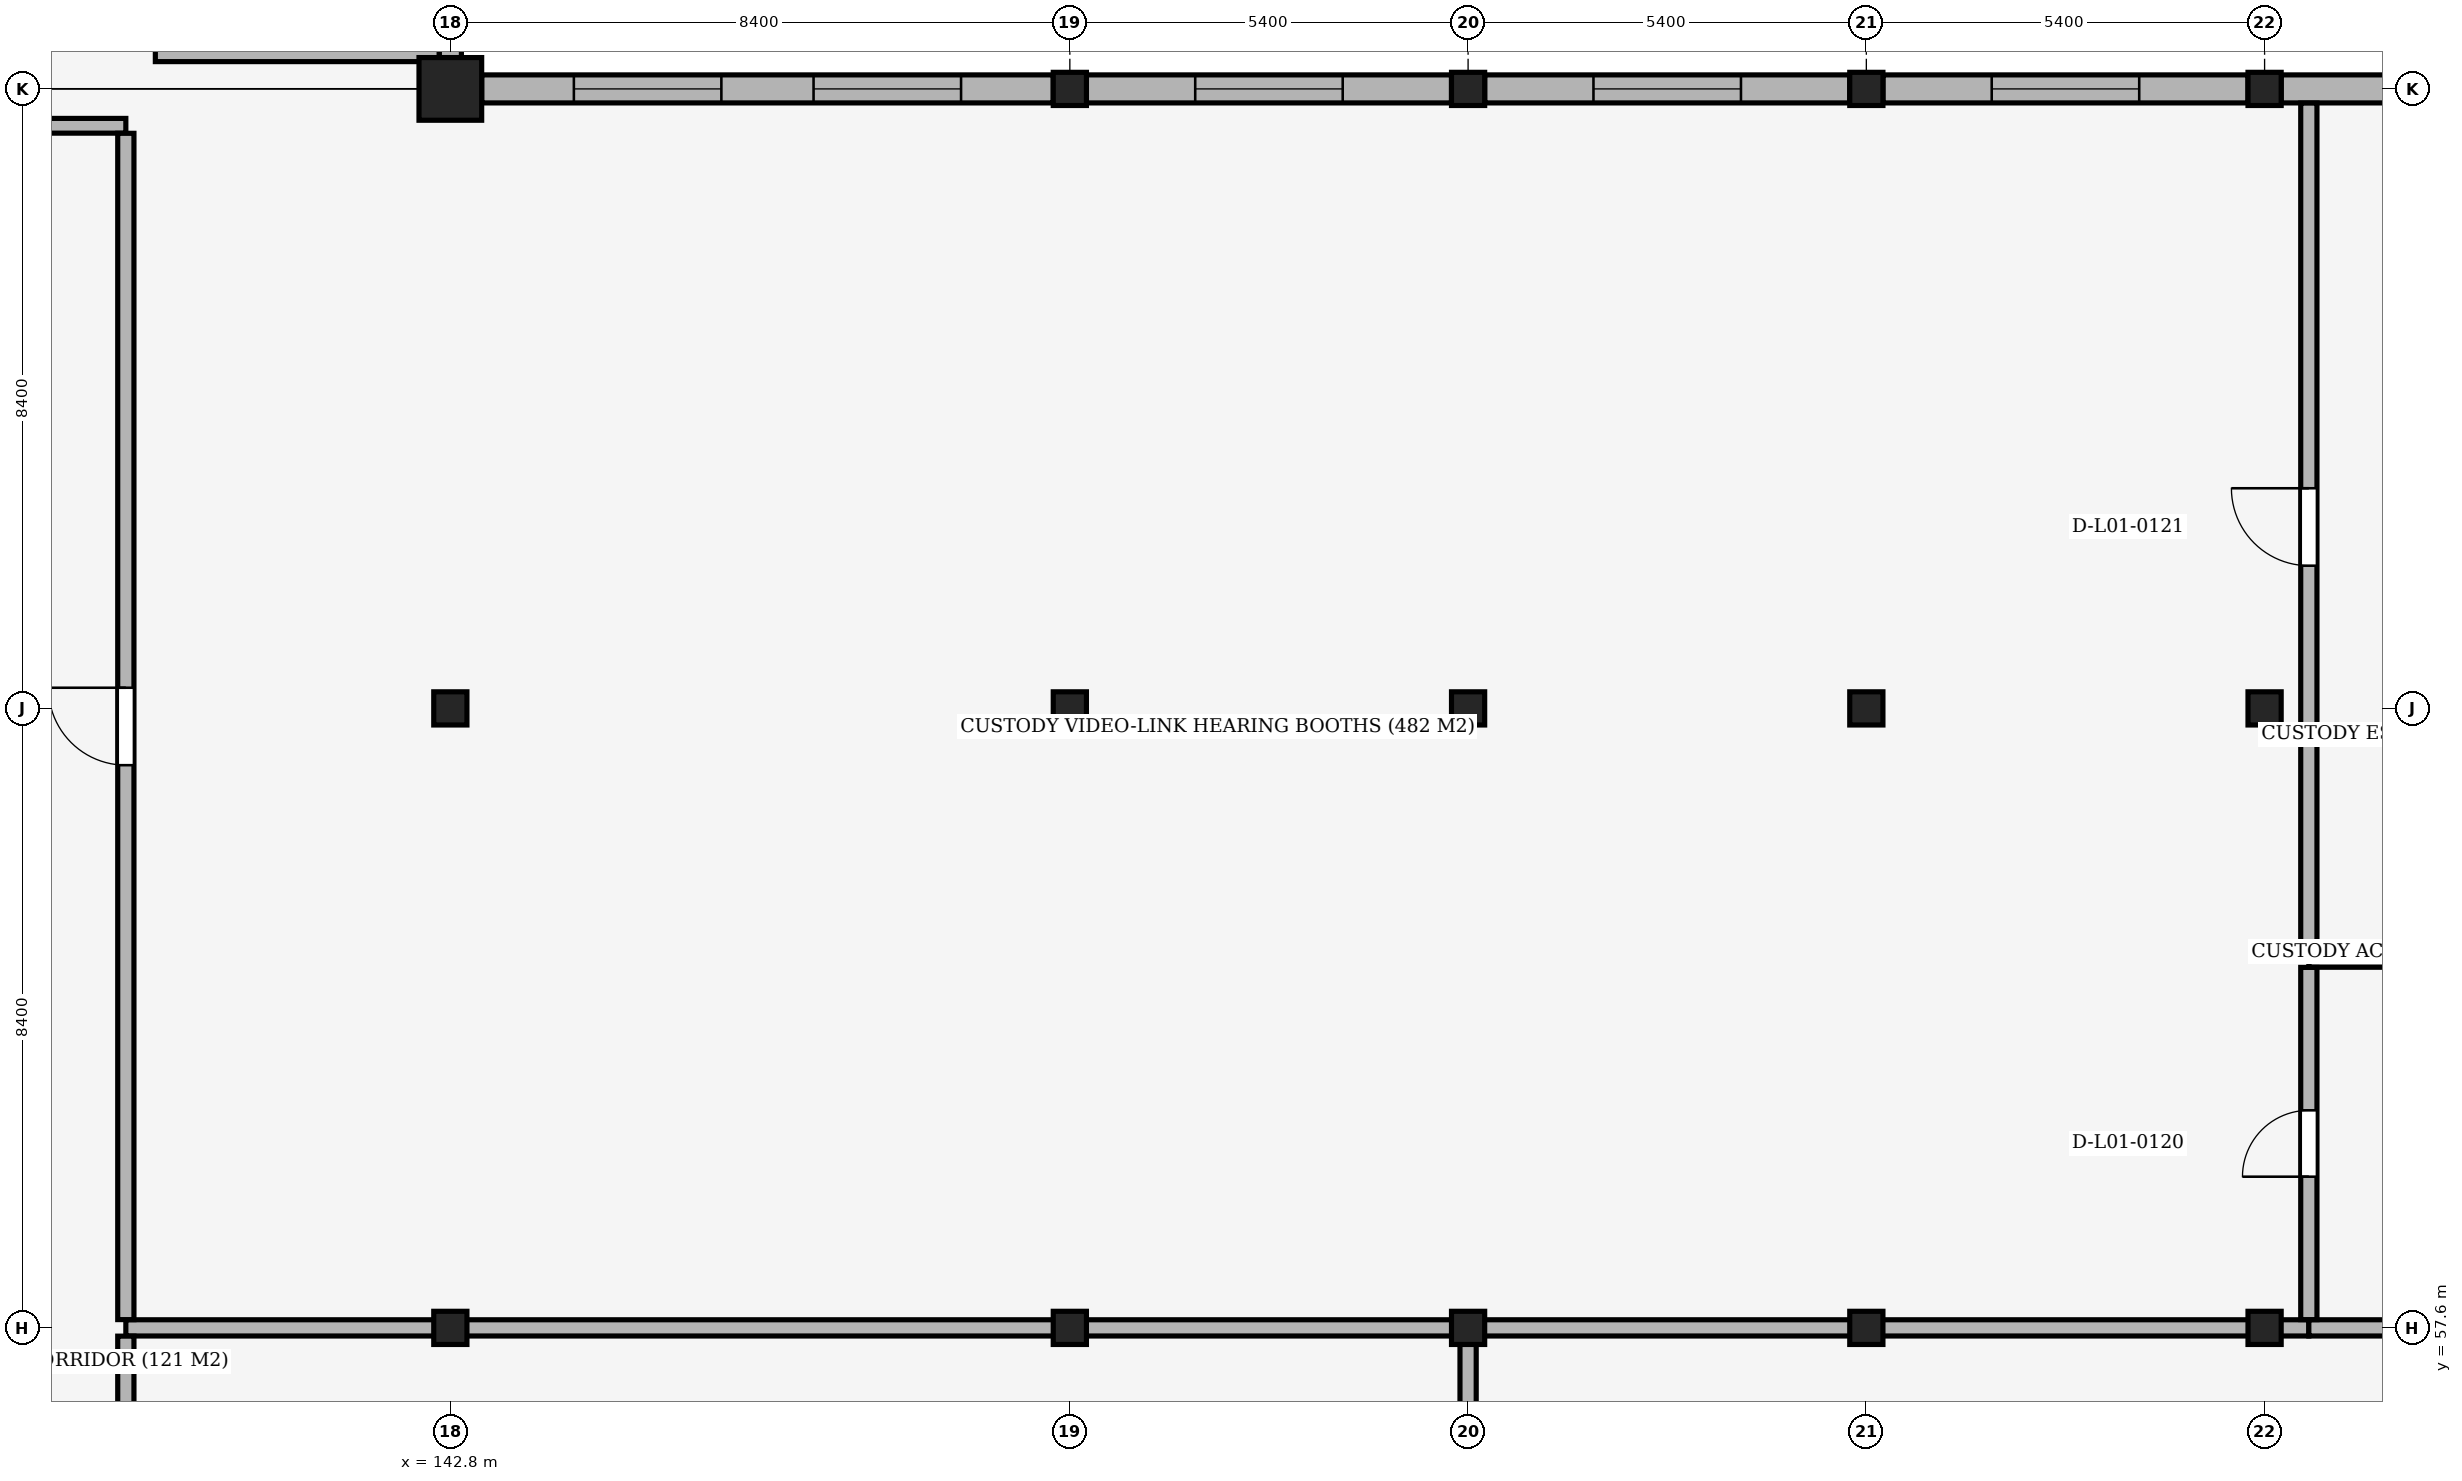
"""IFC4 building model, lengths in metres.
Left out: names, types, materials, properties, quantities, classifications, styles, units other than length and angle.
Written with IfcOpenShell. Run it as: python <this file> out.ifc"""

import sys

from ifc_helpers import new_model, si_unit, direction, frame, frame_2d, origin, origin_2d, place, context, subcontext, project, spatial, rectangle, extrude, element, fill, save


model = new_model("IFC4")
c1 = context("Model", 3, precision=1e-05, world=origin(), true_north=direction((0.0, 1.0)))
c2 = subcontext(c1, "Body", "Model", "MODEL_VIEW")
j1 = project(units=[si_unit("LENGTHUNIT", "METRE"), si_unit("PLANEANGLEUNIT", "RADIAN")], contexts=[c1])
p1 = place(None, origin())
s1 = spatial("IfcSite", under=j1, at=p1, CompositionType="ELEMENT")
p2 = place(p1, origin())
s2 = spatial("IfcBuilding", under=s1, at=p2, CompositionType="ELEMENT")
p3 = place(p2, frame((0.0, 0.0, 5.1)))
s3 = spatial("IfcBuildingStorey", under=s2, at=p3, CompositionType="ELEMENT", Elevation=5.1)
for number, where, z_axis, x_axis in (
    (1, (142.8, 57.6, 0.0), (0.0, 0.0, 1.0), (1.0, 0.0, 0.0)),
    (2, (142.8, 66.0, 0.0), (0.0, 0.0, 1.0), (1.0, 0.0, 0.0)),
):
    element("IfcColumn", number, at=place(p3, frame(where, z_axis=z_axis, x_axis=x_axis)), inside=s3, PredefinedType="COLUMN", context=c2, shape_type="SweptSolid", body=[
        extrude(rectangle(XDim=0.45, YDim=0.45, at=origin_2d()), origin(), (0.0, 0.0, 1.0), 5.1),
    ])
p4 = place(p3, frame((142.8, 74.4, 0.0), z_axis=(0.0, 0.0, 1.0), x_axis=(1.0, 0.0, 0.0)))
e3 = element("IfcColumn", 3, at=p4, inside=s3, PredefinedType="COLUMN", context=c2, shape_type="SweptSolid", body=[
    extrude(rectangle(XDim=0.85, YDim=0.85, at=origin_2d()), origin(), (0.0, 0.0, 1.0), 5.1),
])
for number, where, z_axis, x_axis in (
    (4, (151.2, 57.6, 0.0), (0.0, 0.0, 1.0), (1.0, 0.0, 0.0)),
    (5, (151.2, 66.0, 0.0), (0.0, 0.0, 1.0), (1.0, 0.0, 0.0)),
    (6, (151.2, 74.4, 0.0), (0.0, 0.0, 1.0), (1.0, 0.0, 0.0)),
    (7, (156.6, 57.6, 0.0), (0.0, 0.0, 1.0), (1.0, 0.0, 0.0)),
    (8, (156.6, 66.0, 0.0), (0.0, 0.0, 1.0), (1.0, 0.0, 0.0)),
    (9, (156.6, 74.4, 0.0), (0.0, 0.0, 1.0), (1.0, 0.0, 0.0)),
    (10, (162.0, 57.6, 0.0), (0.0, 0.0, 1.0), (1.0, 0.0, 0.0)),
    (11, (162.0, 66.0, 0.0), (0.0, 0.0, 1.0), (1.0, 0.0, 0.0)),
    (12, (162.0, 74.4, 0.0), (0.0, 0.0, 1.0), (1.0, 0.0, 0.0)),
    (13, (167.4, 57.6, 0.0), (0.0, 0.0, 1.0), (1.0, 0.0, 0.0)),
    (14, (167.4, 66.0, 0.0), (0.0, 0.0, 1.0), (1.0, 0.0, 0.0)),
    (15, (167.4, 74.4, 0.0), (0.0, 0.0, 1.0), (1.0, 0.0, 0.0)),
):
    element("IfcColumn", number, at=place(p3, frame(where, z_axis=z_axis, x_axis=x_axis)), inside=s3, PredefinedType="COLUMN", context=c2, shape_type="SweptSolid", body=[
        extrude(rectangle(XDim=0.45, YDim=0.45, at=origin_2d()), origin(), (0.0, 0.0, 1.0), 5.1),
    ])
p5 = place(p3, frame((142.8, 79.375, 0.0), z_axis=(0.0, 0.0, 1.0), x_axis=(0.0, -1.0, 0.0)))
e16 = element("IfcWall", 16, at=p5, inside=s3, PredefinedType="SOLIDWALL", context=c2, shape_type="SweptSolid", body=[
    extrude(rectangle(XDim=4.55, YDim=0.3, at=frame_2d((2.275, 0.0))), origin(), (0.0, 0.0, 1.0), 4.27),
])
p6 = place(p5, frame((1.525, 0.0, 0.9)))
e17 = element("IfcOpeningElement", 17, at=p6, cuts=e16, PredefinedType="OPENING", context=c2, shape_type="SweptSolid", body=[
    extrude(rectangle(XDim=1.5, YDim=2.1, at=frame_2d((0.75, 1.05))), frame((0.0, 0.165, 0.0), z_axis=(0.0, -1.0, 0.0), x_axis=(1.0, 0.0, 0.0)), (0.0, 0.0, 1.0), 0.33),
])
p7 = place(p3, frame((143.225, 74.4, 0.0), z_axis=(0.0, 0.0, 1.0), x_axis=(1.0, 0.0, 0.0)))
e18 = element("IfcWall", 18, at=p7, inside=s3, PredefinedType="SOLIDWALL", context=c2, shape_type="SweptSolid", body=[
    extrude(rectangle(XDim=7.75, YDim=0.38, at=frame_2d((3.875, 0.0))), origin(), (0.0, 0.0, 1.0), 4.07),
])
p8 = place(p7, frame((1.25, 0.0, 2.1)))
e19 = element("IfcOpeningElement", 19, at=p8, cuts=e18, PredefinedType="OPENING", context=c2, shape_type="SweptSolid", body=[
    extrude(rectangle(XDim=2.0, YDim=1.2, at=frame_2d((1.0, 0.6))), frame((0.0, 0.205, 0.0), z_axis=(0.0, -1.0, 0.0), x_axis=(1.0, 0.0, 0.0)), (0.0, 0.0, 1.0), 0.41),
])
p9 = place(p7, frame((4.5, 0.0, 2.1)))
e20 = element("IfcOpeningElement", 20, at=p9, cuts=e18, PredefinedType="OPENING", context=c2, shape_type="SweptSolid", body=[
    extrude(rectangle(XDim=2.0, YDim=1.2, at=frame_2d((1.0, 0.6))), frame((0.0, 0.205, 0.0), z_axis=(0.0, -1.0, 0.0), x_axis=(1.0, 0.0, 0.0)), (0.0, 0.0, 1.0), 0.41),
])
p10 = place(p3, frame((151.425, 74.4, 0.0), z_axis=(0.0, 0.0, 1.0), x_axis=(1.0, 0.0, 0.0)))
e21 = element("IfcWall", 21, at=p10, inside=s3, PredefinedType="SOLIDWALL", context=c2, shape_type="SweptSolid", body=[
    extrude(rectangle(XDim=4.95, YDim=0.38, at=frame_2d((2.475, 0.0))), origin(), (0.0, 0.0, 1.0), 4.07),
])
p11 = place(p10, frame((1.475, 0.0, 2.1)))
e22 = element("IfcOpeningElement", 22, at=p11, cuts=e21, PredefinedType="OPENING", context=c2, shape_type="SweptSolid", body=[
    extrude(rectangle(XDim=2.0, YDim=1.2, at=frame_2d((1.0, 0.6))), frame((0.0, 0.205, 0.0), z_axis=(0.0, -1.0, 0.0), x_axis=(1.0, 0.0, 0.0)), (0.0, 0.0, 1.0), 0.41),
])
p12 = place(p3, frame((156.825, 74.4, 0.0), z_axis=(0.0, 0.0, 1.0), x_axis=(1.0, 0.0, 0.0)))
e23 = element("IfcWall", 23, at=p12, inside=s3, PredefinedType="SOLIDWALL", context=c2, shape_type="SweptSolid", body=[
    extrude(rectangle(XDim=4.95, YDim=0.38, at=frame_2d((2.475, 0.0))), origin(), (0.0, 0.0, 1.0), 4.22),
])
p13 = place(p12, frame((1.475, 0.0, 2.1)))
e24 = element("IfcOpeningElement", 24, at=p13, cuts=e23, PredefinedType="OPENING", context=c2, shape_type="SweptSolid", body=[
    extrude(rectangle(XDim=2.0, YDim=1.2, at=frame_2d((1.0, 0.6))), frame((0.0, 0.205, 0.0), z_axis=(0.0, -1.0, 0.0), x_axis=(1.0, 0.0, 0.0)), (0.0, 0.0, 1.0), 0.41),
])
p14 = place(p3, frame((162.225, 74.4, 0.0), z_axis=(0.0, 0.0, 1.0), x_axis=(1.0, 0.0, 0.0)))
e25 = element("IfcWall", 25, at=p14, inside=s3, PredefinedType="SOLIDWALL", context=c2, shape_type="SweptSolid", body=[
    extrude(rectangle(XDim=4.95, YDim=0.38, at=frame_2d((2.475, 0.0))), origin(), (0.0, 0.0, 1.0), 4.22),
])
p15 = place(p14, frame((1.475, 0.0, 2.1)))
e26 = element("IfcOpeningElement", 26, at=p15, cuts=e25, PredefinedType="OPENING", context=c2, shape_type="SweptSolid", body=[
    extrude(rectangle(XDim=2.0, YDim=1.2, at=frame_2d((1.0, 0.6))), frame((0.0, 0.205, 0.0), z_axis=(0.0, -1.0, 0.0), x_axis=(1.0, 0.0, 0.0)), (0.0, 0.0, 1.0), 0.41),
])
p16 = place(p3, frame((167.625, 74.4, 0.0), z_axis=(0.0, 0.0, 1.0), x_axis=(1.0, 0.0, 0.0)))
e27 = element("IfcWall", 27, at=p16, inside=s3, PredefinedType="SOLIDWALL", context=c2, shape_type="SweptSolid", body=[
    extrude(rectangle(XDim=4.95, YDim=0.38, at=frame_2d((2.475, 0.0))), origin(), (0.0, 0.0, 1.0), 4.22),
])
p17 = place(p16, frame((1.475, 0.0, 2.1)))
e28 = element("IfcOpeningElement", 28, at=p17, cuts=e27, PredefinedType="OPENING", context=c2, shape_type="SweptSolid", body=[
    extrude(rectangle(XDim=2.0, YDim=1.2, at=frame_2d((1.0, 0.6))), frame((0.0, 0.205, 0.0), z_axis=(0.0, -1.0, 0.0), x_axis=(1.0, 0.0, 0.0)), (0.0, 0.0, 1.0), 0.41),
])
p18 = place(p3, frame((138.4, 57.6, 0.0), z_axis=(0.0, 0.0, 1.0), x_axis=(1.0, 0.0, 0.0)))
e29 = element("IfcWall", 29, at=p18, inside=s3, PredefinedType="PARTITIONING", context=c2, shape_type="SweptSolid", body=[
    extrude(rectangle(XDim=18.2, YDim=0.22, at=frame_2d((9.1, 0.0))), origin(), (0.0, 0.0, 1.0), 4.02),
])
p19 = place(p3, frame((156.6, 57.6, 0.0), z_axis=(0.0, 0.0, 1.0), x_axis=(1.0, 0.0, 0.0)))
e30 = element("IfcWall", 30, at=p19, inside=s3, PredefinedType="PARTITIONING", context=c2, shape_type="SweptSolid", body=[
    extrude(rectangle(XDim=11.4, YDim=0.22, at=frame_2d((5.7, 0.0))), origin(), (0.0, 0.0, 1.0), 4.02),
])
p20 = place(p3, frame((168.0, 57.6, 0.0), z_axis=(0.0, 0.0, 1.0), x_axis=(1.0, 0.0, 0.0)))
e31 = element("IfcWall", 31, at=p20, inside=s3, PredefinedType="PARTITIONING", context=c2, shape_type="SweptSolid", body=[
    extrude(rectangle(XDim=4.741, YDim=0.22, at=frame_2d((2.371, 0.0))), origin(), (0.0, 0.0, 1.0), 4.02),
])
p21 = place(p3, frame((168.0, 62.6, 0.0), z_axis=(0.0, 0.0, 1.0), x_axis=(1.0, 0.0, 0.0)))
e32 = element("IfcWall", 32, at=p21, inside=s3, PredefinedType="PARTITIONING", context=c2, shape_type="SweptSolid", body=[
    extrude(rectangle(XDim=4.608, YDim=0.22, at=frame_2d((2.304, 0.0))), origin(), (0.0, 0.0, 1.0), 4.02),
])
p22 = place(p3, frame((134.592, 73.9, 0.0), z_axis=(0.0, 0.0, 1.0), x_axis=(1.0, 0.0, 0.0)))
e33 = element("IfcWall", 33, at=p22, inside=s3, PredefinedType="PARTITIONING", context=c2, shape_type="SweptSolid", body=[
    extrude(rectangle(XDim=3.808, YDim=0.2, at=frame_2d((1.904, 0.0))), origin(), (0.0, 0.0, 1.0), 4.02),
])
p23 = place(p3, frame((138.8, 74.9, 0.0), z_axis=(0.0, 0.0, 1.0), x_axis=(1.0, 0.0, 0.0)))
e34 = element("IfcWall", 34, at=p23, inside=s3, PredefinedType="PARTITIONING", context=c2, shape_type="SweptSolid", body=[
    extrude(rectangle(XDim=3.848, YDim=0.26, at=frame_2d((1.924, 0.0))), origin(), (0.0, 0.0, 1.0), 4.27),
])
p24 = place(p3, frame((138.4, 41.2, 0.0), z_axis=(0.0, 0.0, 1.0), x_axis=(0.0, 1.0, 0.0)))
e35 = element("IfcWall", 35, at=p24, inside=s3, PredefinedType="PARTITIONING", context=c2, shape_type="SweptSolid", body=[
    extrude(rectangle(XDim=16.288, YDim=0.22, at=frame_2d((8.144, 0.0))), origin(), (0.0, 0.0, 1.0), 4.07),
])
p25 = place(p24, frame((7.619, 0.0, 0.0)))
e36 = element("IfcOpeningElement", 36, at=p25, cuts=e35, PredefinedType="OPENING", context=c2, shape_type="SweptSolid", body=[
    extrude(rectangle(XDim=1.05, YDim=2.15, at=frame_2d((0.525, 1.075))), frame((0.0, 0.125, 0.0), z_axis=(0.0, -1.0, 0.0), x_axis=(1.0, 0.0, 0.0)), (0.0, 0.0, 1.0), 0.25),
])
p26 = place(p3, frame((138.4, 57.712, 0.0), z_axis=(0.0, 0.0, 1.0), x_axis=(0.0, 1.0, 0.0)))
e37 = element("IfcWall", 37, at=p26, inside=s3, PredefinedType="PARTITIONING", context=c2, shape_type="SweptSolid", body=[
    extrude(rectangle(XDim=16.086, YDim=0.22, at=frame_2d((8.043, 0.0))), origin(), (0.0, 0.0, 1.0), 4.07),
])
p27 = place(p26, frame((7.518, 0.0, 0.0)))
e38 = element("IfcOpeningElement", 38, at=p27, cuts=e37, PredefinedType="OPENING", context=c2, shape_type="SweptSolid", body=[
    extrude(rectangle(XDim=1.05, YDim=2.15, at=frame_2d((0.525, 1.075))), frame((0.0, 0.125, 0.0), z_axis=(0.0, -1.0, 0.0), x_axis=(1.0, 0.0, 0.0)), (0.0, 0.0, 1.0), 0.25),
])
p28 = place(p3, frame((156.6, 40.853, 0.0), z_axis=(0.0, 0.0, 1.0), x_axis=(0.0, 1.0, 0.0)))
e39 = element("IfcWall", 39, at=p28, inside=s3, PredefinedType="PARTITIONING", context=c2, shape_type="SweptSolid", body=[
    extrude(rectangle(XDim=16.635, YDim=0.22, at=frame_2d((8.317, 0.0))), origin(), (0.0, 0.0, 1.0), 4.02),
])
p29 = place(p28, frame((5.792, 0.0, 0.0)))
e40 = element("IfcOpeningElement", 40, at=p29, cuts=e39, PredefinedType="OPENING", context=c2, shape_type="SweptSolid", body=[
    extrude(rectangle(XDim=1.05, YDim=2.15, at=frame_2d((0.525, 1.075))), frame((0.0, 0.125, 0.0), z_axis=(0.0, -1.0, 0.0), x_axis=(1.0, 0.0, 0.0)), (0.0, 0.0, 1.0), 0.25),
])
p30 = place(p3, frame((168.0, 57.712, 0.0), z_axis=(0.0, 0.0, 1.0), x_axis=(0.0, 1.0, 0.0)))
e41 = element("IfcWall", 41, at=p30, inside=s3, PredefinedType="PARTITIONING", context=c2, shape_type="SweptSolid", body=[
    extrude(rectangle(XDim=4.776, YDim=0.22, at=frame_2d((2.388, 0.0))), origin(), (0.0, 0.0, 1.0), 4.22),
])
p31 = place(p30, frame((1.938, 0.0, 0.0)))
e42 = element("IfcOpeningElement", 42, at=p31, cuts=e41, PredefinedType="OPENING", context=c2, shape_type="SweptSolid", body=[
    extrude(rectangle(XDim=0.9, YDim=2.1, at=frame_2d((0.45, 1.05))), frame((0.0, 0.125, 0.0), z_axis=(0.0, -1.0, 0.0), x_axis=(1.0, 0.0, 0.0)), (0.0, 0.0, 1.0), 0.25),
])
p32 = place(p3, frame((168.0, 62.712, 0.0), z_axis=(0.0, 0.0, 1.0), x_axis=(0.0, 1.0, 0.0)))
e43 = element("IfcWall", 43, at=p32, inside=s3, PredefinedType="PARTITIONING", context=c2, shape_type="SweptSolid", body=[
    extrude(rectangle(XDim=11.496, YDim=0.22, at=frame_2d((5.748, 0.0))), origin(), (0.0, 0.0, 1.0), 4.22),
])
p33 = place(p32, frame((5.223, 0.0, 0.0)))
e44 = element("IfcOpeningElement", 44, at=p33, cuts=e43, PredefinedType="OPENING", context=c2, shape_type="SweptSolid", body=[
    extrude(rectangle(XDim=1.05, YDim=2.15, at=frame_2d((0.525, 1.075))), frame((0.0, 0.125, 0.0), z_axis=(0.0, -1.0, 0.0), x_axis=(1.0, 0.0, 0.0)), (0.0, 0.0, 1.0), 0.25),
])
p34 = place(p8, origin())
e45 = element("IfcWindow", 45, at=p34, inside=s3, PartitioningType="SINGLE_PANEL", PredefinedType="WINDOW", context=c2, shape_type="SweptSolid", body=[
    extrude(rectangle(XDim=2.0, YDim=1.2, at=frame_2d((1.0, 0.6))), frame((0.0, 0.03, 0.0), z_axis=(0.0, -1.0, 0.0), x_axis=(1.0, 0.0, 0.0)), (0.0, 0.0, 1.0), 0.06),
])
fill(e19, e45)
p35 = place(p9, origin())
e46 = element("IfcWindow", 46, at=p35, inside=s3, PartitioningType="SINGLE_PANEL", PredefinedType="WINDOW", context=c2, shape_type="SweptSolid", body=[
    extrude(rectangle(XDim=2.0, YDim=1.2, at=frame_2d((1.0, 0.6))), frame((0.0, 0.03, 0.0), z_axis=(0.0, -1.0, 0.0), x_axis=(1.0, 0.0, 0.0)), (0.0, 0.0, 1.0), 0.06),
])
fill(e20, e46)
p36 = place(p11, origin())
e47 = element("IfcWindow", 47, at=p36, inside=s3, PartitioningType="SINGLE_PANEL", PredefinedType="WINDOW", context=c2, shape_type="SweptSolid", body=[
    extrude(rectangle(XDim=2.0, YDim=1.2, at=frame_2d((1.0, 0.6))), frame((0.0, 0.03, 0.0), z_axis=(0.0, -1.0, 0.0), x_axis=(1.0, 0.0, 0.0)), (0.0, 0.0, 1.0), 0.06),
])
fill(e22, e47)
p37 = place(p13, origin())
e48 = element("IfcWindow", 48, at=p37, inside=s3, PartitioningType="SINGLE_PANEL", PredefinedType="WINDOW", context=c2, shape_type="SweptSolid", body=[
    extrude(rectangle(XDim=2.0, YDim=1.2, at=frame_2d((1.0, 0.6))), frame((0.0, 0.03, 0.0), z_axis=(0.0, -1.0, 0.0), x_axis=(1.0, 0.0, 0.0)), (0.0, 0.0, 1.0), 0.06),
])
fill(e24, e48)
p38 = place(p15, origin())
e49 = element("IfcWindow", 49, at=p38, inside=s3, PartitioningType="SINGLE_PANEL", PredefinedType="WINDOW", context=c2, shape_type="SweptSolid", body=[
    extrude(rectangle(XDim=2.0, YDim=1.2, at=frame_2d((1.0, 0.6))), frame((0.0, 0.03, 0.0), z_axis=(0.0, -1.0, 0.0), x_axis=(1.0, 0.0, 0.0)), (0.0, 0.0, 1.0), 0.06),
])
fill(e26, e49)
p39 = place(p27, origin())
e50 = element("IfcDoor", 50, at=p39, inside=s3, OperationType="SINGLE_SWING_RIGHT", PredefinedType="DOOR", context=c2, shape_type="SweptSolid", body=[
    extrude(rectangle(XDim=1.05, YDim=2.15, at=frame_2d((0.525, 1.075))), frame((0.0, 0.025, 0.0), z_axis=(0.0, -1.0, 0.0), x_axis=(1.0, 0.0, 0.0)), (0.0, 0.0, 1.0), 0.05),
])
fill(e38, e50)
p40 = place(p31, origin())
e51 = element("IfcDoor", 51, at=p40, inside=s3, OperationType="SINGLE_SWING_LEFT", PredefinedType="DOOR", context=c2, shape_type="SweptSolid", body=[
    extrude(rectangle(XDim=0.9, YDim=2.1, at=frame_2d((0.45, 1.05))), frame((0.0, 0.025, 0.0), z_axis=(0.0, -1.0, 0.0), x_axis=(1.0, 0.0, 0.0)), (0.0, 0.0, 1.0), 0.05),
])
fill(e42, e51)
p41 = place(p33, origin())
e52 = element("IfcDoor", 52, at=p41, inside=s3, OperationType="SINGLE_SWING_RIGHT", PredefinedType="DOOR", context=c2, shape_type="SweptSolid", body=[
    extrude(rectangle(XDim=1.05, YDim=2.15, at=frame_2d((0.525, 1.075))), frame((0.0, 0.025, 0.0), z_axis=(0.0, -1.0, 0.0), x_axis=(1.0, 0.0, 0.0)), (0.0, 0.0, 1.0), 0.05),
])
fill(e44, e52)
save(model, sys.argv[1])
